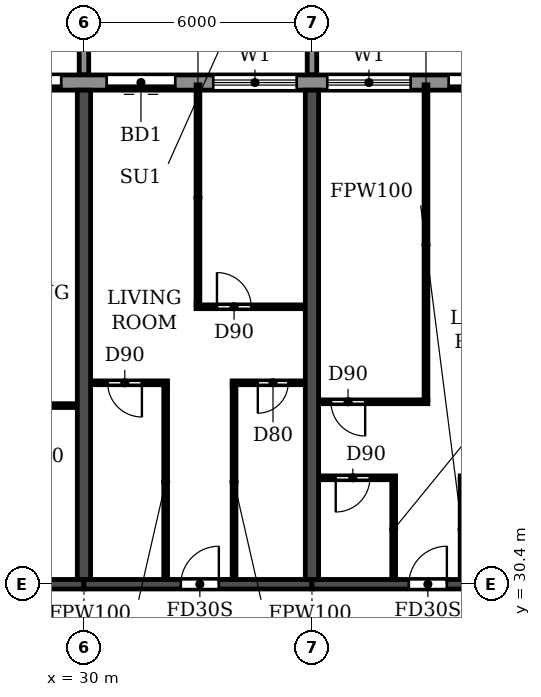
"""IFC4 building model, lengths in metres.
Left out: names, types, materials, properties, quantities, classifications, styles, units other than length and angle.
Written with IfcOpenShell. Run it as: python <this file> out.ifc"""

import sys

from ifc_helpers import new_model, si_unit, direction, frame, frame_2d, origin, place, context, subcontext, project, spatial, polyline, rectangle, outline, extrude, source, transform, mapped, element, fill, save


model = new_model("IFC4")
c1 = context("Model", 3, precision=1e-05, world=origin(), true_north=direction((0.0, 1.0)))
c2 = subcontext(c1, "Body", "Model", "MODEL_VIEW")
j1 = project(units=[si_unit("LENGTHUNIT", "METRE"), si_unit("PLANEANGLEUNIT", "RADIAN")], contexts=[c1])
p1 = place(None, origin())
s1 = spatial("IfcSite", under=j1, at=p1, CompositionType="ELEMENT")
p2 = place(p1, origin())
s2 = spatial("IfcBuilding", under=s1, at=p2, CompositionType="ELEMENT")
p3 = place(p2, frame((0.0, 0.0, 109.2)))
s3 = spatial("IfcBuildingStorey", under=s2, at=p3, CompositionType="ELEMENT", Elevation=109.2)
for number, where, z_axis, x_axis in (
    (1, (30.0, 30.525, 0.0), (0.0, 0.0, 1.0), (0.0, 1.0, 0.0)),
    (2, (36.0, 30.525, 0.0), (0.0, 0.0, 1.0), (0.0, 1.0, 0.0)),
):
    element("IfcWall", number, at=place(p3, frame(where, z_axis=z_axis, x_axis=x_axis)), inside=s3, PredefinedType="SHEAR", context=c2, shape_type="SweptSolid", body=[
        extrude(rectangle(XDim=12.875, YDim=0.35, at=frame_2d((6.438, 0.0))), origin(), (0.0, 0.0, 1.0), 3.06),
    ])
p4 = place(p3, frame((24.0, 30.4, 0.0), z_axis=(0.0, 0.0, 1.0), x_axis=(1.0, 0.0, 0.0)))
e3 = element("IfcWall", 3, at=p4, inside=s3, PredefinedType="SHEAR", context=c2, shape_type="SweptSolid", body=[
    extrude(rectangle(XDim=6.0, YDim=0.25, at=frame_2d((3.0, 0.0))), origin(), (0.0, 0.0, 1.0), 2.46),
])
p5 = place(p4, frame((2.55, 0.0, 0.0)))
e4 = element("IfcOpeningElement", 4, at=p5, cuts=e3, PredefinedType="OPENING", context=c2, shape_type="SweptSolid", body=[
    extrude(rectangle(XDim=1.0, YDim=2.1, at=frame_2d((0.5, 1.05))), frame((0.0, 0.135, 0.0), z_axis=(0.0, -1.0, 0.0), x_axis=(1.0, 0.0, 0.0)), (0.0, 0.0, 1.0), 0.27),
])
p6 = place(p3, frame((30.0, 30.4, 0.0), z_axis=(0.0, 0.0, 1.0), x_axis=(1.0, 0.0, 0.0)))
e5 = element("IfcWall", 5, at=p6, inside=s3, PredefinedType="SHEAR", context=c2, shape_type="SweptSolid", body=[
    extrude(rectangle(XDim=6.0, YDim=0.25, at=frame_2d((3.0, 0.0))), origin(), (0.0, 0.0, 1.0), 2.46),
])
p7 = place(p6, frame((2.55, 0.0, 0.0)))
e6 = element("IfcOpeningElement", 6, at=p7, cuts=e5, PredefinedType="OPENING", context=c2, shape_type="SweptSolid", body=[
    extrude(rectangle(XDim=1.0, YDim=2.1, at=frame_2d((0.5, 1.05))), frame((0.0, 0.135, 0.0), z_axis=(0.0, -1.0, 0.0), x_axis=(1.0, 0.0, 0.0)), (0.0, 0.0, 1.0), 0.27),
])
p8 = place(p3, frame((36.0, 30.4, 0.0), z_axis=(0.0, 0.0, 1.0), x_axis=(1.0, 0.0, 0.0)))
e7 = element("IfcWall", 7, at=p8, inside=s3, PredefinedType="SHEAR", context=c2, shape_type="SweptSolid", body=[
    extrude(rectangle(XDim=6.0, YDim=0.25, at=frame_2d((3.0, 0.0))), origin(), (0.0, 0.0, 1.0), 2.46),
])
p9 = place(p8, frame((2.55, 0.0, 0.0)))
e8 = element("IfcOpeningElement", 8, at=p9, cuts=e7, PredefinedType="OPENING", context=c2, shape_type="SweptSolid", body=[
    extrude(rectangle(XDim=1.0, YDim=2.1, at=frame_2d((0.5, 1.05))), frame((0.0, 0.135, 0.0), z_axis=(0.0, -1.0, 0.0), x_axis=(1.0, 0.0, 0.0)), (0.0, 0.0, 1.0), 0.27),
])
p10 = place(p3, frame((85.317, 43.6, 0.0), z_axis=(0.0, 0.0, 1.0), x_axis=(-1.0, 0.0, 0.0)))
e9 = element("IfcWall", 9, at=p10, inside=s3, PredefinedType="STANDARD", context=c2, shape_type="SweptSolid", body=[
    extrude(rectangle(XDim=68.634, YDim=0.4, at=frame_2d((34.317, 0.0))), origin(), (0.0, 0.0, 1.0), 3.06),
])
p11 = place(p10, frame((64.917, 0.0, 0.0)))
e10 = element("IfcOpeningElement", 10, at=p11, cuts=e9, PredefinedType="OPENING", context=c2, shape_type="SweptSolid", body=[
    extrude(rectangle(XDim=1.8, YDim=2.4, at=frame_2d((0.9, 1.2))), frame((0.0, 0.21, 0.0), z_axis=(0.0, -1.0, 0.0), x_axis=(1.0, 0.0, 0.0)), (0.0, 0.0, 1.0), 0.42),
])
p12 = place(p10, frame((61.717, 0.0, 0.9)))
e11 = element("IfcOpeningElement", 11, at=p12, cuts=e9, PredefinedType="OPENING", context=c2, shape_type="SweptSolid", body=[
    extrude(rectangle(XDim=2.2, YDim=1.5, at=frame_2d((1.1, 0.75))), frame((0.0, 0.21, 0.0), z_axis=(0.0, -1.0, 0.0), x_axis=(1.0, 0.0, 0.0)), (0.0, 0.0, 1.0), 0.42),
])
p13 = place(p10, frame((58.717, 0.0, 0.9)))
e12 = element("IfcOpeningElement", 12, at=p13, cuts=e9, PredefinedType="OPENING", context=c2, shape_type="SweptSolid", body=[
    extrude(rectangle(XDim=2.2, YDim=1.5, at=frame_2d((1.1, 0.75))), frame((0.0, 0.21, 0.0), z_axis=(0.0, -1.0, 0.0), x_axis=(1.0, 0.0, 0.0)), (0.0, 0.0, 1.0), 0.42),
])
p14 = place(p10, frame((55.917, 0.0, 0.0)))
e13 = element("IfcOpeningElement", 13, at=p14, cuts=e9, PredefinedType="OPENING", context=c2, shape_type="SweptSolid", body=[
    extrude(rectangle(XDim=1.8, YDim=2.4, at=frame_2d((0.9, 1.2))), frame((0.0, 0.21, 0.0), z_axis=(0.0, -1.0, 0.0), x_axis=(1.0, 0.0, 0.0)), (0.0, 0.0, 1.0), 0.42),
])
p15 = place(p10, frame((52.917, 0.0, 0.0)))
e14 = element("IfcOpeningElement", 14, at=p15, cuts=e9, PredefinedType="OPENING", context=c2, shape_type="SweptSolid", body=[
    extrude(rectangle(XDim=1.8, YDim=2.4, at=frame_2d((0.9, 1.2))), frame((0.0, 0.21, 0.0), z_axis=(0.0, -1.0, 0.0), x_axis=(1.0, 0.0, 0.0)), (0.0, 0.0, 1.0), 0.42),
])
p16 = place(p10, frame((49.717, 0.0, 0.9)))
e15 = element("IfcOpeningElement", 15, at=p16, cuts=e9, PredefinedType="OPENING", context=c2, shape_type="SweptSolid", body=[
    extrude(rectangle(XDim=2.2, YDim=1.5, at=frame_2d((1.1, 0.75))), frame((0.0, 0.21, 0.0), z_axis=(0.0, -1.0, 0.0), x_axis=(1.0, 0.0, 0.0)), (0.0, 0.0, 1.0), 0.42),
])
p17 = place(p10, frame((46.717, 0.0, 0.9)))
e16 = element("IfcOpeningElement", 16, at=p17, cuts=e9, PredefinedType="OPENING", context=c2, shape_type="SweptSolid", body=[
    extrude(rectangle(XDim=2.2, YDim=1.5, at=frame_2d((1.1, 0.75))), frame((0.0, 0.21, 0.0), z_axis=(0.0, -1.0, 0.0), x_axis=(1.0, 0.0, 0.0)), (0.0, 0.0, 1.0), 0.42),
])
p18 = place(p10, frame((43.917, 0.0, 0.0)))
e17 = element("IfcOpeningElement", 17, at=p18, cuts=e9, PredefinedType="OPENING", context=c2, shape_type="SweptSolid", body=[
    extrude(rectangle(XDim=1.8, YDim=2.4, at=frame_2d((0.9, 1.2))), frame((0.0, 0.21, 0.0), z_axis=(0.0, -1.0, 0.0), x_axis=(1.0, 0.0, 0.0)), (0.0, 0.0, 1.0), 0.42),
])
p19 = place(p10, frame((40.717, 0.0, 0.9)))
e18 = element("IfcOpeningElement", 18, at=p19, cuts=e9, PredefinedType="OPENING", context=c2, shape_type="SweptSolid", body=[
    extrude(rectangle(XDim=2.2, YDim=1.5, at=frame_2d((1.1, 0.75))), frame((0.0, 0.21, 0.0), z_axis=(0.0, -1.0, 0.0), x_axis=(1.0, 0.0, 0.0)), (0.0, 0.0, 1.0), 0.42),
])
p20 = place(p10, frame((37.717, 0.0, 0.9)))
e19 = element("IfcOpeningElement", 19, at=p20, cuts=e9, PredefinedType="OPENING", context=c2, shape_type="SweptSolid", body=[
    extrude(rectangle(XDim=2.2, YDim=1.5, at=frame_2d((1.1, 0.75))), frame((0.0, 0.21, 0.0), z_axis=(0.0, -1.0, 0.0), x_axis=(1.0, 0.0, 0.0)), (0.0, 0.0, 1.0), 0.42),
])
p21 = place(p10, frame((34.917, 0.0, 0.0)))
e20 = element("IfcOpeningElement", 20, at=p21, cuts=e9, PredefinedType="OPENING", context=c2, shape_type="SweptSolid", body=[
    extrude(rectangle(XDim=1.8, YDim=2.4, at=frame_2d((0.9, 1.2))), frame((0.0, 0.21, 0.0), z_axis=(0.0, -1.0, 0.0), x_axis=(1.0, 0.0, 0.0)), (0.0, 0.0, 1.0), 0.42),
])
p22 = place(p10, frame((31.717, 0.0, 0.9)))
e21 = element("IfcOpeningElement", 21, at=p22, cuts=e9, PredefinedType="OPENING", context=c2, shape_type="SweptSolid", body=[
    extrude(rectangle(XDim=2.2, YDim=1.5, at=frame_2d((1.1, 0.75))), frame((0.0, 0.21, 0.0), z_axis=(0.0, -1.0, 0.0), x_axis=(1.0, 0.0, 0.0)), (0.0, 0.0, 1.0), 0.42),
])
p23 = place(p10, frame((28.917, 0.0, 0.0)))
e22 = element("IfcOpeningElement", 22, at=p23, cuts=e9, PredefinedType="OPENING", context=c2, shape_type="SweptSolid", body=[
    extrude(rectangle(XDim=1.8, YDim=2.4, at=frame_2d((0.9, 1.2))), frame((0.0, 0.21, 0.0), z_axis=(0.0, -1.0, 0.0), x_axis=(1.0, 0.0, 0.0)), (0.0, 0.0, 1.0), 0.42),
])
p24 = place(p10, frame((25.717, 0.0, 0.9)))
e23 = element("IfcOpeningElement", 23, at=p24, cuts=e9, PredefinedType="OPENING", context=c2, shape_type="SweptSolid", body=[
    extrude(rectangle(XDim=2.2, YDim=1.5, at=frame_2d((1.1, 0.75))), frame((0.0, 0.21, 0.0), z_axis=(0.0, -1.0, 0.0), x_axis=(1.0, 0.0, 0.0)), (0.0, 0.0, 1.0), 0.42),
])
p25 = place(p10, frame((22.717, 0.0, 0.9)))
e24 = element("IfcOpeningElement", 24, at=p25, cuts=e9, PredefinedType="OPENING", context=c2, shape_type="SweptSolid", body=[
    extrude(rectangle(XDim=2.2, YDim=1.5, at=frame_2d((1.1, 0.75))), frame((0.0, 0.21, 0.0), z_axis=(0.0, -1.0, 0.0), x_axis=(1.0, 0.0, 0.0)), (0.0, 0.0, 1.0), 0.42),
])
p26 = place(p10, frame((19.917, 0.0, 0.0)))
e25 = element("IfcOpeningElement", 25, at=p26, cuts=e9, PredefinedType="OPENING", context=c2, shape_type="SweptSolid", body=[
    extrude(rectangle(XDim=1.8, YDim=2.4, at=frame_2d((0.9, 1.2))), frame((0.0, 0.21, 0.0), z_axis=(0.0, -1.0, 0.0), x_axis=(1.0, 0.0, 0.0)), (0.0, 0.0, 1.0), 0.42),
])
p27 = place(p10, frame((16.717, 0.0, 0.9)))
e26 = element("IfcOpeningElement", 26, at=p27, cuts=e9, PredefinedType="OPENING", context=c2, shape_type="SweptSolid", body=[
    extrude(rectangle(XDim=2.2, YDim=1.5, at=frame_2d((1.1, 0.75))), frame((0.0, 0.21, 0.0), z_axis=(0.0, -1.0, 0.0), x_axis=(1.0, 0.0, 0.0)), (0.0, 0.0, 1.0), 0.42),
])
p28 = place(p10, frame((13.917, 0.0, 0.0)))
e27 = element("IfcOpeningElement", 27, at=p28, cuts=e9, PredefinedType="OPENING", context=c2, shape_type="SweptSolid", body=[
    extrude(rectangle(XDim=1.8, YDim=2.4, at=frame_2d((0.9, 1.2))), frame((0.0, 0.21, 0.0), z_axis=(0.0, -1.0, 0.0), x_axis=(1.0, 0.0, 0.0)), (0.0, 0.0, 1.0), 0.42),
])
p29 = place(p10, frame((10.717, 0.0, 0.9)))
e28 = element("IfcOpeningElement", 28, at=p29, cuts=e9, PredefinedType="OPENING", context=c2, shape_type="SweptSolid", body=[
    extrude(rectangle(XDim=2.2, YDim=1.5, at=frame_2d((1.1, 0.75))), frame((0.0, 0.21, 0.0), z_axis=(0.0, -1.0, 0.0), x_axis=(1.0, 0.0, 0.0)), (0.0, 0.0, 1.0), 0.42),
])
p30 = place(p10, frame((7.717, 0.0, 0.9)))
e29 = element("IfcOpeningElement", 29, at=p30, cuts=e9, PredefinedType="OPENING", context=c2, shape_type="SweptSolid", body=[
    extrude(rectangle(XDim=2.2, YDim=1.5, at=frame_2d((1.1, 0.75))), frame((0.0, 0.21, 0.0), z_axis=(0.0, -1.0, 0.0), x_axis=(1.0, 0.0, 0.0)), (0.0, 0.0, 1.0), 0.42),
])
p31 = place(p10, frame((4.917, 0.0, 0.0)))
e30 = element("IfcOpeningElement", 30, at=p31, cuts=e9, PredefinedType="OPENING", context=c2, shape_type="SweptSolid", body=[
    extrude(rectangle(XDim=1.8, YDim=2.4, at=frame_2d((0.9, 1.2))), frame((0.0, 0.21, 0.0), z_axis=(0.0, -1.0, 0.0), x_axis=(1.0, 0.0, 0.0)), (0.0, 0.0, 1.0), 0.42),
])
p32 = place(p10, frame((1.717, 0.0, 0.9)))
e31 = element("IfcOpeningElement", 31, at=p32, cuts=e9, PredefinedType="OPENING", context=c2, shape_type="SweptSolid", body=[
    extrude(rectangle(XDim=2.2, YDim=1.5, at=frame_2d((1.1, 0.75))), frame((0.0, 0.21, 0.0), z_axis=(0.0, -1.0, 0.0), x_axis=(1.0, 0.0, 0.0)), (0.0, 0.0, 1.0), 0.42),
])
m1 = source(origin(), c2, "Body", "SweptSolid", [
    extrude(outline(polyline([(0.0, 0.0), (0.25, 0.0), (0.25, 3.1), (0.0, 3.1), (0.0, 0.0)])), origin(), (0.0, 0.0, 1.0), 3.1),
])
for number, where in (
    (32, (29.875, 43.8, 0.0)),
    (33, (35.875, 43.8, 0.0)),
):
    element("IfcWall", number, at=place(p3, frame(where)), inside=s3, PredefinedType="STANDARD", context=c2, shape_type="MappedRepresentation", body=[
        mapped(m1, transform((0.0, 0.0, 0.0))),
    ])
p33 = place(p3, frame((36.185, 33.2, 0.0), z_axis=(0.0, 0.0, 1.0), x_axis=(1.0, 0.0, 0.0)))
e34 = element("IfcWall", 34, at=p33, inside=s3, PredefinedType="PARTITIONING", context=c2, shape_type="SweptSolid", body=[
    extrude(rectangle(XDim=2.015, YDim=0.1, at=frame_2d((1.007, 0.0))), origin(), (0.0, 0.0, 1.0), 3.06),
])
p34 = place(p33, frame((0.44, 0.0, 0.0)))
e35 = element("IfcOpeningElement", 35, at=p34, cuts=e34, PredefinedType="OPENING", context=c2, shape_type="SweptSolid", body=[
    extrude(rectangle(XDim=0.9, YDim=2.1, at=frame_2d((0.45, 1.05))), frame((0.0, 0.06, 0.0), z_axis=(0.0, -1.0, 0.0), x_axis=(1.0, 0.0, 0.0)), (0.0, 0.0, 1.0), 0.12),
])
p35 = place(p3, frame((39.9, 33.2, 0.0), z_axis=(0.0, 0.0, 1.0), x_axis=(1.0, 0.0, 0.0)))
e36 = element("IfcWall", 36, at=p35, inside=s3, PredefinedType="PARTITIONING", context=c2, shape_type="SweptSolid", body=[
    extrude(rectangle(XDim=1.915, YDim=0.1, at=frame_2d((0.958, 0.0))), origin(), (0.0, 0.0, 1.0), 3.06),
])
p36 = place(p35, frame((0.675, 0.0, 0.0)))
e37 = element("IfcOpeningElement", 37, at=p36, cuts=e36, PredefinedType="OPENING", context=c2, shape_type="SweptSolid", body=[
    extrude(rectangle(XDim=0.8, YDim=2.1, at=frame_2d((0.4, 1.05))), frame((0.0, 0.06, 0.0), z_axis=(0.0, -1.0, 0.0), x_axis=(1.0, 0.0, 0.0)), (0.0, 0.0, 1.0), 0.12),
])
p37 = place(p3, frame((27.9, 35.1, 0.0), z_axis=(0.0, 0.0, 1.0), x_axis=(1.0, 0.0, 0.0)))
e38 = element("IfcWall", 38, at=p37, inside=s3, PredefinedType="PARTITIONING", context=c2, shape_type="SweptSolid", body=[
    extrude(rectangle(XDim=1.915, YDim=0.1, at=frame_2d((0.958, 0.0))), origin(), (0.0, 0.0, 1.0), 3.06),
])
p38 = place(p3, frame((36.185, 35.2, 0.0), z_axis=(0.0, 0.0, 1.0), x_axis=(1.0, 0.0, 0.0)))
e39 = element("IfcWall", 39, at=p38, inside=s3, PredefinedType="PARTITIONING", context=c2, shape_type="SweptSolid", body=[
    extrude(rectangle(XDim=2.865, YDim=0.1, at=frame_2d((1.433, 0.0))), origin(), (0.0, 0.0, 1.0), 3.06),
])
p39 = place(p38, frame((0.315, 0.0, 0.0)))
e40 = element("IfcOpeningElement", 40, at=p39, cuts=e39, PredefinedType="OPENING", context=c2, shape_type="SweptSolid", body=[
    extrude(rectangle(XDim=0.9, YDim=2.1, at=frame_2d((0.45, 1.05))), frame((0.0, 0.06, 0.0), z_axis=(0.0, -1.0, 0.0), x_axis=(1.0, 0.0, 0.0)), (0.0, 0.0, 1.0), 0.12),
])
p40 = place(p3, frame((30.185, 35.7, 0.0), z_axis=(0.0, 0.0, 1.0), x_axis=(1.0, 0.0, 0.0)))
e41 = element("IfcWall", 41, at=p40, inside=s3, PredefinedType="PARTITIONING", context=c2, shape_type="SweptSolid", body=[
    extrude(rectangle(XDim=2.015, YDim=0.1, at=frame_2d((1.007, 0.0))), origin(), (0.0, 0.0, 1.0), 3.06),
])
p41 = place(p40, frame((0.44, 0.0, 0.0)))
e42 = element("IfcOpeningElement", 42, at=p41, cuts=e41, PredefinedType="OPENING", context=c2, shape_type="SweptSolid", body=[
    extrude(rectangle(XDim=0.9, YDim=2.1, at=frame_2d((0.45, 1.05))), frame((0.0, 0.06, 0.0), z_axis=(0.0, -1.0, 0.0), x_axis=(1.0, 0.0, 0.0)), (0.0, 0.0, 1.0), 0.12),
])
p42 = place(p3, frame((33.9, 35.7, 0.0), z_axis=(0.0, 0.0, 1.0), x_axis=(1.0, 0.0, 0.0)))
e43 = element("IfcWall", 43, at=p42, inside=s3, PredefinedType="PARTITIONING", context=c2, shape_type="SweptSolid", body=[
    extrude(rectangle(XDim=1.915, YDim=0.1, at=frame_2d((0.958, 0.0))), origin(), (0.0, 0.0, 1.0), 3.06),
])
p43 = place(p42, frame((0.675, 0.0, 0.0)))
e44 = element("IfcOpeningElement", 44, at=p43, cuts=e43, PredefinedType="OPENING", context=c2, shape_type="SweptSolid", body=[
    extrude(rectangle(XDim=0.8, YDim=2.1, at=frame_2d((0.4, 1.05))), frame((0.0, 0.06, 0.0), z_axis=(0.0, -1.0, 0.0), x_axis=(1.0, 0.0, 0.0)), (0.0, 0.0, 1.0), 0.12),
])
p44 = place(p3, frame((32.95, 37.7, 0.0), z_axis=(0.0, 0.0, 1.0), x_axis=(1.0, 0.0, 0.0)))
e45 = element("IfcWall", 45, at=p44, inside=s3, PredefinedType="PARTITIONING", context=c2, shape_type="SweptSolid", body=[
    extrude(rectangle(XDim=2.865, YDim=0.1, at=frame_2d((1.433, 0.0))), origin(), (0.0, 0.0, 1.0), 3.06),
])
p45 = place(p44, frame((0.55, 0.0, 0.0)))
e46 = element("IfcOpeningElement", 46, at=p45, cuts=e45, PredefinedType="OPENING", context=c2, shape_type="SweptSolid", body=[
    extrude(rectangle(XDim=0.9, YDim=2.1, at=frame_2d((0.45, 1.05))), frame((0.0, 0.06, 0.0), z_axis=(0.0, -1.0, 0.0), x_axis=(1.0, 0.0, 0.0)), (0.0, 0.0, 1.0), 0.12),
])
p46 = place(p3, frame((32.15, 30.535, 0.0), z_axis=(0.0, 0.0, 1.0), x_axis=(0.0, 1.0, 0.0)))
e47 = element("IfcWall", 47, at=p46, inside=s3, PredefinedType="PARTITIONING", context=c2, shape_type="SweptSolid", body=[
    extrude(rectangle(XDim=5.115, YDim=0.1, at=frame_2d((2.558, 0.0))), origin(), (0.0, 0.0, 1.0), 3.06),
])
p47 = place(p3, frame((33.0, 37.75, 0.0), z_axis=(0.0, 0.0, 1.0), x_axis=(0.0, 1.0, 0.0)))
e48 = element("IfcWall", 48, at=p47, inside=s3, PredefinedType="PARTITIONING", context=c2, shape_type="SweptSolid", body=[
    extrude(rectangle(XDim=5.79, YDim=0.1, at=frame_2d((2.895, 0.0))), origin(), (0.0, 0.0, 1.0), 3.06),
])
p48 = place(p3, frame((33.95, 30.535, 0.0), z_axis=(0.0, 0.0, 1.0), x_axis=(0.0, 1.0, 0.0)))
e49 = element("IfcWall", 49, at=p48, inside=s3, PredefinedType="PARTITIONING", context=c2, shape_type="SweptSolid", body=[
    extrude(rectangle(XDim=5.115, YDim=0.1, at=frame_2d((2.558, 0.0))), origin(), (0.0, 0.0, 1.0), 3.06),
])
p49 = place(p3, frame((38.15, 30.535, 0.0), z_axis=(0.0, 0.0, 1.0), x_axis=(0.0, 1.0, 0.0)))
e50 = element("IfcWall", 50, at=p49, inside=s3, PredefinedType="PARTITIONING", context=c2, shape_type="SweptSolid", body=[
    extrude(rectangle(XDim=2.615, YDim=0.1, at=frame_2d((1.308, 0.0))), origin(), (0.0, 0.0, 1.0), 3.06),
])
p50 = place(p3, frame((39.0, 35.25, 0.0), z_axis=(0.0, 0.0, 1.0), x_axis=(0.0, 1.0, 0.0)))
e51 = element("IfcWall", 51, at=p50, inside=s3, PredefinedType="PARTITIONING", context=c2, shape_type="SweptSolid", body=[
    extrude(rectangle(XDim=8.29, YDim=0.1, at=frame_2d((4.145, 0.0))), origin(), (0.0, 0.0, 1.0), 3.06),
])
p51 = place(p3, frame((39.95, 30.535, 0.0), z_axis=(0.0, 0.0, 1.0), x_axis=(0.0, 1.0, 0.0)))
e52 = element("IfcWall", 52, at=p51, inside=s3, PredefinedType="PARTITIONING", context=c2, shape_type="SweptSolid", body=[
    extrude(rectangle(XDim=2.615, YDim=0.1, at=frame_2d((1.308, 0.0))), origin(), (0.0, 0.0, 1.0), 3.06),
])
p52 = place(p14, origin())
e53 = element("IfcDoor", 53, at=p52, inside=s3, OperationType="DOUBLE_DOOR_SLIDING", PredefinedType="DOOR", context=c2, shape_type="SweptSolid", body=[
    extrude(rectangle(XDim=1.8, YDim=2.4, at=frame_2d((0.9, 1.2))), frame((0.0, 0.025, 0.0), z_axis=(0.0, -1.0, 0.0), x_axis=(1.0, 0.0, 0.0)), (0.0, 0.0, 1.0), 0.05),
])
fill(e13, e53)
p53 = place(p15, origin())
e54 = element("IfcDoor", 54, at=p53, inside=s3, OperationType="DOUBLE_DOOR_SLIDING", PredefinedType="DOOR", context=c2, shape_type="SweptSolid", body=[
    extrude(rectangle(XDim=1.8, YDim=2.4, at=frame_2d((0.9, 1.2))), frame((0.0, 0.025, 0.0), z_axis=(0.0, -1.0, 0.0), x_axis=(1.0, 0.0, 0.0)), (0.0, 0.0, 1.0), 0.05),
])
fill(e14, e54)
p54 = place(p16, origin())
e55 = element("IfcWindow", 55, at=p54, inside=s3, PartitioningType="DOUBLE_PANEL_HORIZONTAL", PredefinedType="WINDOW", context=c2, shape_type="SweptSolid", body=[
    extrude(rectangle(XDim=2.2, YDim=1.5, at=frame_2d((1.1, 0.75))), frame((0.0, 0.03, 0.0), z_axis=(0.0, -1.0, 0.0), x_axis=(1.0, 0.0, 0.0)), (0.0, 0.0, 1.0), 0.06),
])
fill(e15, e55)
p55 = place(p17, origin())
e56 = element("IfcWindow", 56, at=p55, inside=s3, PartitioningType="DOUBLE_PANEL_HORIZONTAL", PredefinedType="WINDOW", context=c2, shape_type="SweptSolid", body=[
    extrude(rectangle(XDim=2.2, YDim=1.5, at=frame_2d((1.1, 0.75))), frame((0.0, 0.03, 0.0), z_axis=(0.0, -1.0, 0.0), x_axis=(1.0, 0.0, 0.0)), (0.0, 0.0, 1.0), 0.06),
])
fill(e16, e56)
p56 = place(p18, origin())
e57 = element("IfcDoor", 57, at=p56, inside=s3, OperationType="DOUBLE_DOOR_SLIDING", PredefinedType="DOOR", context=c2, shape_type="SweptSolid", body=[
    extrude(rectangle(XDim=1.8, YDim=2.4, at=frame_2d((0.9, 1.2))), frame((0.0, 0.025, 0.0), z_axis=(0.0, -1.0, 0.0), x_axis=(1.0, 0.0, 0.0)), (0.0, 0.0, 1.0), 0.05),
])
fill(e17, e57)
p57 = place(p41, frame((0.9, 0.0, 0.0), z_axis=(0.0, 0.0, 1.0), x_axis=(-1.0, 0.0, 0.0)))
e58 = element("IfcDoor", 58, at=p57, inside=s3, OperationType="SINGLE_SWING_LEFT", PredefinedType="DOOR", context=c2, shape_type="SweptSolid", body=[
    extrude(rectangle(XDim=0.9, YDim=2.1, at=frame_2d((0.45, 1.05))), frame((0.0, 0.025, 0.0), z_axis=(0.0, -1.0, 0.0), x_axis=(1.0, 0.0, 0.0)), (0.0, 0.0, 1.0), 0.05),
])
fill(e42, e58)
p58 = place(p7, origin())
e59 = element("IfcDoor", 59, at=p58, inside=s3, OperationType="SINGLE_SWING_RIGHT", PredefinedType="DOOR", context=c2, shape_type="SweptSolid", body=[
    extrude(rectangle(XDim=1.0, YDim=2.1, at=frame_2d((0.5, 1.05))), frame((0.0, 0.025, 0.0), z_axis=(0.0, -1.0, 0.0), x_axis=(1.0, 0.0, 0.0)), (0.0, 0.0, 1.0), 0.05),
])
fill(e6, e59)
p59 = place(p45, origin())
e60 = element("IfcDoor", 60, at=p59, inside=s3, OperationType="SINGLE_SWING_LEFT", PredefinedType="DOOR", context=c2, shape_type="SweptSolid", body=[
    extrude(rectangle(XDim=0.9, YDim=2.1, at=frame_2d((0.45, 1.05))), frame((0.0, 0.025, 0.0), z_axis=(0.0, -1.0, 0.0), x_axis=(1.0, 0.0, 0.0)), (0.0, 0.0, 1.0), 0.05),
])
fill(e46, e60)
p60 = place(p43, frame((0.8, 0.0, 0.0), z_axis=(0.0, 0.0, 1.0), x_axis=(-1.0, 0.0, 0.0)))
e61 = element("IfcDoor", 61, at=p60, inside=s3, OperationType="SINGLE_SWING_RIGHT", PredefinedType="DOOR", context=c2, shape_type="SweptSolid", body=[
    extrude(rectangle(XDim=0.8, YDim=2.1, at=frame_2d((0.4, 1.05))), frame((0.0, 0.025, 0.0), z_axis=(0.0, -1.0, 0.0), x_axis=(1.0, 0.0, 0.0)), (0.0, 0.0, 1.0), 0.05),
])
fill(e44, e61)
p61 = place(p39, frame((0.9, 0.0, 0.0), z_axis=(0.0, 0.0, 1.0), x_axis=(-1.0, 0.0, 0.0)))
e62 = element("IfcDoor", 62, at=p61, inside=s3, OperationType="SINGLE_SWING_LEFT", PredefinedType="DOOR", context=c2, shape_type="SweptSolid", body=[
    extrude(rectangle(XDim=0.9, YDim=2.1, at=frame_2d((0.45, 1.05))), frame((0.0, 0.025, 0.0), z_axis=(0.0, -1.0, 0.0), x_axis=(1.0, 0.0, 0.0)), (0.0, 0.0, 1.0), 0.05),
])
fill(e40, e62)
p62 = place(p34, frame((0.9, 0.0, 0.0), z_axis=(0.0, 0.0, 1.0), x_axis=(-1.0, 0.0, 0.0)))
e63 = element("IfcDoor", 63, at=p62, inside=s3, OperationType="SINGLE_SWING_RIGHT", PredefinedType="DOOR", context=c2, shape_type="SweptSolid", body=[
    extrude(rectangle(XDim=0.9, YDim=2.1, at=frame_2d((0.45, 1.05))), frame((0.0, 0.025, 0.0), z_axis=(0.0, -1.0, 0.0), x_axis=(1.0, 0.0, 0.0)), (0.0, 0.0, 1.0), 0.05),
])
fill(e35, e63)
p63 = place(p9, origin())
e64 = element("IfcDoor", 64, at=p63, inside=s3, OperationType="SINGLE_SWING_RIGHT", PredefinedType="DOOR", context=c2, shape_type="SweptSolid", body=[
    extrude(rectangle(XDim=1.0, YDim=2.1, at=frame_2d((0.5, 1.05))), frame((0.0, 0.025, 0.0), z_axis=(0.0, -1.0, 0.0), x_axis=(1.0, 0.0, 0.0)), (0.0, 0.0, 1.0), 0.05),
])
fill(e8, e64)
save(model, sys.argv[1])
